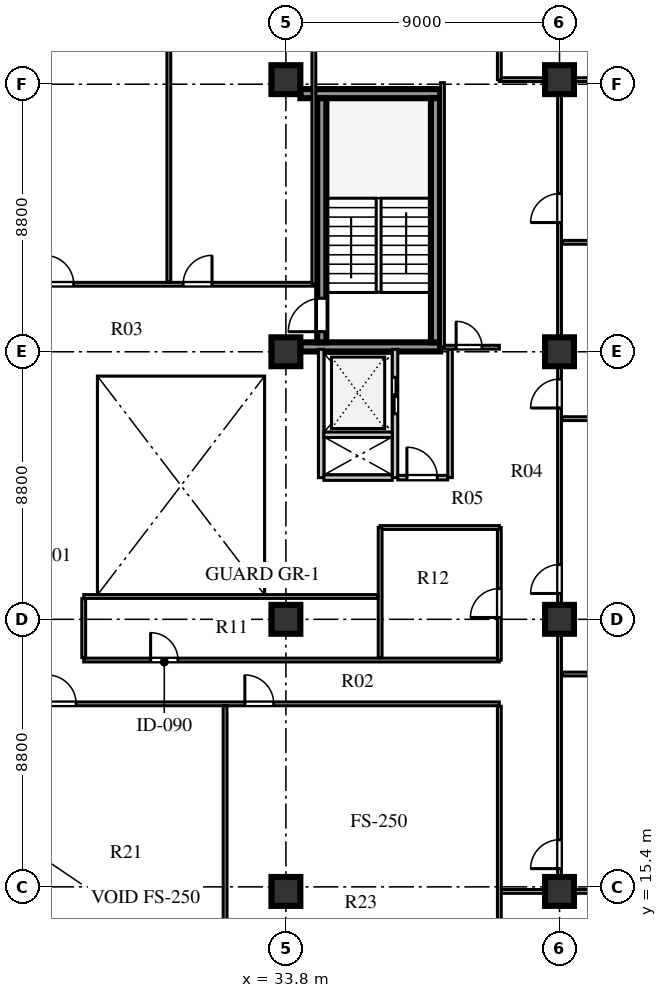
"""IFC4 building model, lengths in metres.
Left out: names, types, materials, properties, quantities, classifications, styles, units other than length and angle.
Written with IfcOpenShell. Run it as: python <this file> out.ifc"""

import sys

from ifc_helpers import new_model, si_unit, direction, frame, frame_2d, origin, origin_2d, place, context, subcontext, project, spatial, rectangle, extrude, element, fill, save


model = new_model("IFC4")
c1 = context("Model", 3, precision=1e-05, world=origin(), true_north=direction((0.0, 1.0)))
c2 = subcontext(c1, "Body", "Model", "MODEL_VIEW")
j1 = project(units=[si_unit("LENGTHUNIT", "METRE"), si_unit("PLANEANGLEUNIT", "RADIAN")], contexts=[c1])
p1 = place(None, origin())
s1 = spatial("IfcSite", under=j1, at=p1, CompositionType="ELEMENT")
p2 = place(p1, origin())
s2 = spatial("IfcBuilding", under=s1, at=p2, CompositionType="ELEMENT")
p3 = place(p2, frame((0.0, 0.0, 165.6)))
s3 = spatial("IfcBuildingStorey", under=s2, at=p3, CompositionType="ELEMENT", Elevation=165.6)
for number, where, z_axis, x_axis in (
    (1, (34.275, 33.16, 0.0), (0.0, 0.0, 1.0), (1.0, 0.0, 0.0)),
    (2, (34.275, 41.49, 0.0), (0.0, 0.0, 1.0), (1.0, 0.0, 0.0)),
):
    element("IfcWall", number, at=place(p3, frame(where, z_axis=z_axis, x_axis=x_axis)), inside=s3, PredefinedType="SHEAR", context=c2, shape_type="SweptSolid", body=[
        extrude(rectangle(XDim=4.595, YDim=0.3, at=frame_2d((2.298, 0.0))), origin(), (0.0, 0.0, 1.0), 3.6),
    ])
p4 = place(p3, frame((34.98, 33.31, 0.0), z_axis=(0.0, 0.0, 1.0), x_axis=(0.0, 1.0, 0.0)))
e3 = element("IfcWall", 3, at=p4, inside=s3, PredefinedType="SHEAR", context=c2, shape_type="SweptSolid", body=[
    extrude(rectangle(XDim=8.03, YDim=0.3, at=frame_2d((4.015, 0.0))), origin(), (0.0, 0.0, 1.0), 3.6),
])
p5 = place(p4, frame((0.35, 0.0, 0.0)))
e4 = element("IfcOpeningElement", 4, at=p5, cuts=e3, PredefinedType="OPENING", context=c2, shape_type="SweptSolid", body=[
    extrude(rectangle(XDim=1.1, YDim=2.1, at=frame_2d((0.55, 1.05))), frame((0.0, 0.16, 0.0), z_axis=(0.0, -1.0, 0.0), x_axis=(1.0, 0.0, 0.0)), (0.0, 0.0, 1.0), 0.32),
])
p6 = place(p3, frame((38.72, 33.31, 0.0), z_axis=(0.0, 0.0, 1.0), x_axis=(0.0, 1.0, 0.0)))
e5 = element("IfcWall", 5, at=p6, inside=s3, PredefinedType="SHEAR", context=c2, shape_type="SweptSolid", body=[
    extrude(rectangle(XDim=8.03, YDim=0.3, at=frame_2d((4.015, 0.0))), origin(), (0.0, 0.0, 1.0), 3.6),
])
for number, where, z_axis, x_axis in (
    (6, (33.8, 15.25, 0.0), (0.0, 0.0, 1.0), (1.0, 0.0, 0.0)),
    (7, (33.8, 24.2, 0.0), (0.0, 0.0, 1.0), (1.0, 0.0, 0.0)),
    (8, (33.8, 33.0, 0.0), (0.0, 0.0, 1.0), (1.0, 0.0, 0.0)),
    (9, (33.8, 41.95, 0.0), (0.0, 0.0, 1.0), (1.0, 0.0, 0.0)),
    (10, (42.8, 15.25, 0.0), (0.0, 0.0, 1.0), (1.0, 0.0, 0.0)),
    (11, (42.8, 24.2, 0.0), (0.0, 0.0, 1.0), (1.0, 0.0, 0.0)),
    (12, (42.8, 33.0, 0.0), (0.0, 0.0, 1.0), (1.0, 0.0, 0.0)),
    (13, (42.8, 41.95, 0.0), (0.0, 0.0, 1.0), (1.0, 0.0, 0.0)),
):
    element("IfcColumn", number, at=place(p3, frame(where, z_axis=z_axis, x_axis=x_axis)), inside=s3, PredefinedType="COLUMN", context=c2, shape_type="SweptSolid", body=[
        extrude(rectangle(XDim=0.95, YDim=0.95, at=origin_2d()), origin(), (0.0, 0.0, 1.0), 3.6),
    ])
p7 = place(p3, frame((34.96, 28.86, 0.0), z_axis=(0.0, 0.0, 1.0), x_axis=(0.0, 1.0, 0.0)))
e14 = element("IfcWall", 14, at=p7, inside=s3, PredefinedType="SOLIDWALL", context=c2, shape_type="SweptSolid", body=[
    extrude(rectangle(XDim=4.22, YDim=0.18, at=frame_2d((2.11, 0.0))), origin(), (0.0, 0.0, 1.0), 3.6),
])
p8 = place(p3, frame((37.39, 28.86, 0.0), z_axis=(0.0, 0.0, 1.0), x_axis=(0.0, 1.0, 0.0)))
e15 = element("IfcWall", 15, at=p8, inside=s3, PredefinedType="SOLIDWALL", context=c2, shape_type="SweptSolid", body=[
    extrude(rectangle(XDim=4.22, YDim=0.18, at=frame_2d((2.11, 0.0))), origin(), (0.0, 0.0, 1.0), 3.6),
])
p9 = place(p8, frame((2.1, 0.0, 0.0)))
e16 = element("IfcOpeningElement", 16, at=p9, cuts=e15, PredefinedType="OPENING", context=c2, shape_type="SweptSolid", body=[
    extrude(rectangle(XDim=1.2, YDim=2.12, at=frame_2d((0.6, 1.06))), frame((0.0, 0.1, 0.0), z_axis=(0.0, -1.0, 0.0), x_axis=(1.0, 0.0, 0.0)), (0.0, 0.0, 1.0), 0.2),
])
for number, where, z_axis, x_axis in (
    (17, (35.05, 28.86, 0.0), (0.0, 0.0, 1.0), (1.0, 0.0, 0.0)),
    (18, (35.05, 30.27, 0.0), (0.0, 0.0, 1.0), (1.0, 0.0, 0.0)),
):
    element("IfcWall", number, at=place(p3, frame(where, z_axis=z_axis, x_axis=x_axis)), inside=s3, PredefinedType="SOLIDWALL", context=c2, shape_type="SweptSolid", body=[
        extrude(rectangle(XDim=2.25, YDim=0.18, at=frame_2d((1.125, 0.0))), origin(), (0.0, 0.0, 1.0), 3.6),
    ])
p10 = place(p3, frame((39.2, 28.86, 0.0), z_axis=(0.0, 0.0, 1.0), x_axis=(0.0, 1.0, 0.0)))
e19 = element("IfcWall", 19, at=p10, inside=s3, PredefinedType="PARTITIONING", context=c2, shape_type="SweptSolid", body=[
    extrude(rectangle(XDim=4.22, YDim=0.15, at=frame_2d((2.11, 0.0))), origin(), (0.0, 0.0, 1.0), 3.6),
])
p11 = place(p3, frame((37.48, 28.86, 0.0), z_axis=(0.0, 0.0, 1.0), x_axis=(1.0, 0.0, 0.0)))
e20 = element("IfcWall", 20, at=p11, inside=s3, PredefinedType="PARTITIONING", context=c2, shape_type="SweptSolid", body=[
    extrude(rectangle(XDim=1.64, YDim=0.15, at=frame_2d((0.82, 0.0))), origin(), (0.0, 0.0, 1.0), 3.6),
])
p12 = place(p11, frame((0.3, 0.0, 0.0)))
e21 = element("IfcOpeningElement", 21, at=p12, cuts=e20, PredefinedType="OPENING", context=c2, shape_type="SweptSolid", body=[
    extrude(rectangle(XDim=1.0, YDim=2.1, at=frame_2d((0.5, 1.05))), frame((0.0, 0.085, 0.0), z_axis=(0.0, -1.0, 0.0), x_axis=(1.0, 0.0, 0.0)), (0.0, 0.0, 1.0), 0.17),
])
p13 = place(p3, frame((25.22, 21.42, 0.0), z_axis=(0.0, 0.0, 1.0), x_axis=(1.0, 0.0, 0.0)))
e22 = element("IfcWall", 22, at=p13, inside=s3, PredefinedType="PLUMBINGWALL", context=c2, shape_type="SweptSolid", body=[
    extrude(rectangle(XDim=15.6, YDim=0.125, at=frame_2d((7.8, 0.0))), origin(), (0.0, 0.0, 1.0), 3.25),
])
p14 = place(p13, frame((0.73, 0.0, 0.0)))
e23 = element("IfcOpeningElement", 23, at=p14, cuts=e22, PredefinedType="OPENING", context=c2, shape_type="SweptSolid", body=[
    extrude(rectangle(XDim=0.95, YDim=2.1, at=frame_2d((0.475, 1.05))), frame((0.0, 0.073, 0.0), z_axis=(0.0, -1.0, 0.0), x_axis=(1.0, 0.0, 0.0)), (0.0, 0.0, 1.0), 0.145),
])
p15 = place(p13, frame((7.23, 0.0, 0.0)))
e24 = element("IfcOpeningElement", 24, at=p15, cuts=e22, PredefinedType="OPENING", context=c2, shape_type="SweptSolid", body=[
    extrude(rectangle(XDim=0.95, YDim=2.1, at=frame_2d((0.475, 1.05))), frame((0.0, 0.073, 0.0), z_axis=(0.0, -1.0, 0.0), x_axis=(1.0, 0.0, 0.0)), (0.0, 0.0, 1.0), 0.145),
])
p16 = place(p3, frame((27.15, 22.86, 0.0), z_axis=(0.0, 0.0, 1.0), x_axis=(1.0, 0.0, 0.0)))
e25 = element("IfcWall", 25, at=p16, inside=s3, PredefinedType="PLUMBINGWALL", context=c2, shape_type="SweptSolid", body=[
    extrude(rectangle(XDim=13.67, YDim=0.125, at=frame_2d((6.835, 0.0))), origin(), (0.0, 0.0, 1.0), 3.6),
])
p17 = place(p16, frame((2.2, 0.0, 0.0)))
e26 = element("IfcOpeningElement", 26, at=p17, cuts=e25, PredefinedType="OPENING", context=c2, shape_type="SweptSolid", body=[
    extrude(rectangle(XDim=0.9, YDim=2.08, at=frame_2d((0.45, 1.04))), frame((0.0, 0.073, 0.0), z_axis=(0.0, -1.0, 0.0), x_axis=(1.0, 0.0, 0.0)), (0.0, 0.0, 1.0), 0.145),
])
p18 = place(p3, frame((25.22, 35.22, 0.0), z_axis=(0.0, 0.0, 1.0), x_axis=(1.0, 0.0, 0.0)))
e27 = element("IfcWall", 27, at=p18, inside=s3, PredefinedType="PLUMBINGWALL", context=c2, shape_type="SweptSolid", body=[
    extrude(rectangle(XDim=9.5, YDim=0.125, at=frame_2d((4.75, 0.0))), origin(), (0.0, 0.0, 1.0), 3.6),
])
p19 = place(p18, frame((0.65, 0.0, 0.0)))
e28 = element("IfcOpeningElement", 28, at=p19, cuts=e27, PredefinedType="OPENING", context=c2, shape_type="SweptSolid", body=[
    extrude(rectangle(XDim=0.95, YDim=2.1, at=frame_2d((0.475, 1.05))), frame((0.0, 0.073, 0.0), z_axis=(0.0, -1.0, 0.0), x_axis=(1.0, 0.0, 0.0)), (0.0, 0.0, 1.0), 0.145),
])
p20 = place(p18, frame((5.2, 0.0, 0.0)))
e29 = element("IfcOpeningElement", 29, at=p20, cuts=e27, PredefinedType="OPENING", context=c2, shape_type="SweptSolid", body=[
    extrude(rectangle(XDim=0.95, YDim=2.1, at=frame_2d((0.475, 1.05))), frame((0.0, 0.073, 0.0), z_axis=(0.0, -1.0, 0.0), x_axis=(1.0, 0.0, 0.0)), (0.0, 0.0, 1.0), 0.145),
])
p21 = place(p3, frame((42.8, 15.25, 0.0), z_axis=(0.0, 0.0, 1.0), x_axis=(0.0, 1.0, 0.0)))
e30 = element("IfcWall", 30, at=p21, inside=s3, PredefinedType="PLUMBINGWALL", context=c2, shape_type="SweptSolid", body=[
    extrude(rectangle(XDim=26.7, YDim=0.125, at=frame_2d((13.35, 0.0))), origin(), (0.0, 0.0, 1.0), 2.95),
])
p22 = place(p21, frame((0.75, 0.0, 0.0)))
e31 = element("IfcOpeningElement", 31, at=p22, cuts=e30, PredefinedType="OPENING", context=c2, shape_type="SweptSolid", body=[
    extrude(rectangle(XDim=0.95, YDim=2.1, at=frame_2d((0.475, 1.05))), frame((0.0, 0.073, 0.0), z_axis=(0.0, -1.0, 0.0), x_axis=(1.0, 0.0, 0.0)), (0.0, 0.0, 1.0), 0.145),
])
p23 = place(p21, frame((9.8, 0.0, 0.0)))
e32 = element("IfcOpeningElement", 32, at=p23, cuts=e30, PredefinedType="OPENING", context=c2, shape_type="SweptSolid", body=[
    extrude(rectangle(XDim=0.95, YDim=2.1, at=frame_2d((0.475, 1.05))), frame((0.0, 0.073, 0.0), z_axis=(0.0, -1.0, 0.0), x_axis=(1.0, 0.0, 0.0)), (0.0, 0.0, 1.0), 0.145),
])
p24 = place(p21, frame((15.9, 0.0, 0.0)))
e33 = element("IfcOpeningElement", 33, at=p24, cuts=e30, PredefinedType="OPENING", context=c2, shape_type="SweptSolid", body=[
    extrude(rectangle(XDim=0.95, YDim=2.1, at=frame_2d((0.475, 1.05))), frame((0.0, 0.073, 0.0), z_axis=(0.0, -1.0, 0.0), x_axis=(1.0, 0.0, 0.0)), (0.0, 0.0, 1.0), 0.145),
])
p25 = place(p21, frame((22.0, 0.0, 0.0)))
e34 = element("IfcOpeningElement", 34, at=p25, cuts=e30, PredefinedType="OPENING", context=c2, shape_type="SweptSolid", body=[
    extrude(rectangle(XDim=0.95, YDim=2.1, at=frame_2d((0.475, 1.05))), frame((0.0, 0.073, 0.0), z_axis=(0.0, -1.0, 0.0), x_axis=(1.0, 0.0, 0.0)), (0.0, 0.0, 1.0), 0.145),
])
for number, where, z_axis, x_axis in (
    (35, (40.82, 15.25, 0.0), (0.0, 0.0, 1.0), (1.0, 0.0, 0.0)),
    (36, (40.82, 41.95, 0.0), (0.0, 0.0, 1.0), (1.0, 0.0, 0.0)),
):
    element("IfcWall", number, at=place(p3, frame(where, z_axis=z_axis, x_axis=x_axis)), inside=s3, PredefinedType="PLUMBINGWALL", context=c2, shape_type="SweptSolid", body=[
        extrude(rectangle(XDim=9.7, YDim=0.125, at=frame_2d((4.85, 0.0))), origin(), (0.0, 0.0, 1.0), 2.95),
    ])
p26 = place(p3, frame((40.82, 22.86, 0.0), z_axis=(0.0, 0.0, 1.0), x_axis=(0.0, 1.0, 0.0)))
e37 = element("IfcWall", 37, at=p26, inside=s3, PredefinedType="PLUMBINGWALL", context=c2, shape_type="SweptSolid", body=[
    extrude(rectangle(XDim=4.36, YDim=0.125, at=frame_2d((2.18, 0.0))), origin(), (0.0, 0.0, 1.0), 3.6),
])
p27 = place(p26, frame((1.4, 0.0, 0.0)))
e38 = element("IfcOpeningElement", 38, at=p27, cuts=e37, PredefinedType="OPENING", context=c2, shape_type="SweptSolid", body=[
    extrude(rectangle(XDim=0.95, YDim=2.1, at=frame_2d((0.475, 1.05))), frame((0.0, 0.073, 0.0), z_axis=(0.0, -1.0, 0.0), x_axis=(1.0, 0.0, 0.0)), (0.0, 0.0, 1.0), 0.145),
])
p28 = place(p3, frame((36.9, 27.22, 0.0), z_axis=(0.0, 0.0, 1.0), x_axis=(1.0, 0.0, 0.0)))
e39 = element("IfcWall", 39, at=p28, inside=s3, PredefinedType="PLUMBINGWALL", context=c2, shape_type="SweptSolid", body=[
    extrude(rectangle(XDim=3.92, YDim=0.125, at=frame_2d((1.96, 0.0))), origin(), (0.0, 0.0, 1.0), 3.25),
])
p29 = place(p3, frame((36.9, 22.94, 0.0), z_axis=(0.0, 0.0, 1.0), x_axis=(0.0, 1.0, 0.0)))
e40 = element("IfcWall", 40, at=p29, inside=s3, PredefinedType="PLUMBINGWALL", context=c2, shape_type="SweptSolid", body=[
    extrude(rectangle(XDim=4.28, YDim=0.125, at=frame_2d((2.14, 0.0))), origin(), (0.0, 0.0, 1.0), 3.6),
])
p30 = place(p3, frame((27.15, 24.95, 0.0), z_axis=(0.0, 0.0, 1.0), x_axis=(1.0, 0.0, 0.0)))
e41 = element("IfcWall", 41, at=p30, inside=s3, PredefinedType="PLUMBINGWALL", context=c2, shape_type="SweptSolid", body=[
    extrude(rectangle(XDim=9.67, YDim=0.125, at=frame_2d((4.835, 0.0))), origin(), (0.0, 0.0, 1.0), 3.05),
])
p31 = place(p3, frame((27.15, 22.94, 0.0), z_axis=(0.0, 0.0, 1.0), x_axis=(0.0, 1.0, 0.0)))
e42 = element("IfcWall", 42, at=p31, inside=s3, PredefinedType="PLUMBINGWALL", context=c2, shape_type="SweptSolid", body=[
    extrude(rectangle(XDim=1.94, YDim=0.125, at=frame_2d((0.97, 0.0))), origin(), (0.0, 0.0, 1.0), 3.6),
])
p32 = place(p3, frame((40.82, 7.88, 0.0), z_axis=(0.0, 0.0, 1.0), x_axis=(0.0, 1.0, 0.0)))
e43 = element("IfcWall", 43, at=p32, inside=s3, PredefinedType="PLUMBINGWALL", context=c2, shape_type="SweptSolid", body=[
    extrude(rectangle(XDim=13.46, YDim=0.125, at=frame_2d((6.73, 0.0))), origin(), (0.0, 0.0, 1.0), 3.6),
])
p33 = place(p3, frame((31.8, 7.88, 0.0), z_axis=(0.0, 0.0, 1.0), x_axis=(0.0, 1.0, 0.0)))
e44 = element("IfcWall", 44, at=p33, inside=s3, PredefinedType="PLUMBINGWALL", context=c2, shape_type="SweptSolid", body=[
    extrude(rectangle(XDim=13.48, YDim=0.125, at=frame_2d((6.74, 0.0))), origin(), (0.0, 0.0, 1.0), 3.6),
])
for number, where, z_axis, x_axis in (
    (45, (42.88, 22.4, 0.0), (0.0, 0.0, 1.0), (1.0, 0.0, 0.0)),
    (46, (42.88, 30.8, 0.0), (0.0, 0.0, 1.0), (1.0, 0.0, 0.0)),
    (47, (42.88, 36.6, 0.0), (0.0, 0.0, 1.0), (1.0, 0.0, 0.0)),
):
    element("IfcWall", number, at=place(p3, frame(where, z_axis=z_axis, x_axis=x_axis)), inside=s3, PredefinedType="PLUMBINGWALL", context=c2, shape_type="SweptSolid", body=[
        extrude(rectangle(XDim=7.64, YDim=0.125, at=frame_2d((3.82, 0.0))), origin(), (0.0, 0.0, 1.0), 3.6),
    ])
p34 = place(p3, frame((34.72, 35.22, 0.0), z_axis=(0.0, 0.0, 1.0), x_axis=(0.0, 1.0, 0.0)))
e48 = element("IfcWall", 48, at=p34, inside=s3, PredefinedType="PLUMBINGWALL", context=c2, shape_type="SweptSolid", body=[
    extrude(rectangle(XDim=14.1, YDim=0.125, at=frame_2d((7.05, 0.0))), origin(), (0.0, 0.0, 1.0), 3.6),
])
p35 = place(p3, frame((29.95, 35.3, 0.0), z_axis=(0.0, 0.0, 1.0), x_axis=(0.0, 1.0, 0.0)))
e49 = element("IfcWall", 49, at=p35, inside=s3, PredefinedType="PLUMBINGWALL", context=c2, shape_type="SweptSolid", body=[
    extrude(rectangle(XDim=14.02, YDim=0.125, at=frame_2d((7.01, 0.0))), origin(), (0.0, 0.0, 1.0), 3.6),
])
p36 = place(p3, frame((38.95, 33.15, 0.0), z_axis=(0.0, 0.0, 1.0), x_axis=(1.0, 0.0, 0.0)))
e50 = element("IfcWall", 50, at=p36, inside=s3, PredefinedType="PLUMBINGWALL", context=c2, shape_type="SweptSolid", body=[
    extrude(rectangle(XDim=1.87, YDim=0.125, at=frame_2d((0.935, 0.0))), origin(), (0.0, 0.0, 1.0), 3.6),
])
p37 = place(p36, frame((0.45, 0.0, 0.0)))
e51 = element("IfcOpeningElement", 51, at=p37, cuts=e50, PredefinedType="OPENING", context=c2, shape_type="SweptSolid", body=[
    extrude(rectangle(XDim=0.85, YDim=2.05, at=frame_2d((0.425, 1.025))), frame((0.0, 0.073, 0.0), z_axis=(0.0, -1.0, 0.0), x_axis=(1.0, 0.0, 0.0)), (0.0, 0.0, 1.0), 0.145),
])
p38 = place(p3, frame((38.95, 33.15, 0.0), z_axis=(0.0, 0.0, 1.0), x_axis=(0.0, 1.0, 0.0)))
e52 = element("IfcWall", 52, at=p38, inside=s3, PredefinedType="PLUMBINGWALL", context=c2, shape_type="SweptSolid", body=[
    extrude(rectangle(XDim=8.7, YDim=0.125, at=frame_2d((4.35, 0.0))), origin(), (0.0, 0.0, 1.0), 3.6),
])
p39 = place(p3, frame((40.82, 41.95, 0.0), z_axis=(0.0, 0.0, 1.0), x_axis=(0.0, 1.0, 0.0)))
e53 = element("IfcWall", 53, at=p39, inside=s3, PredefinedType="PLUMBINGWALL", context=c2, shape_type="SweptSolid", body=[
    extrude(rectangle(XDim=7.37, YDim=0.125, at=frame_2d((3.685, 0.0))), origin(), (0.0, 0.0, 1.0), 3.6),
])
p40 = place(p5, origin())
e54 = element("IfcDoor", 54, at=p40, inside=s3, OperationType="SINGLE_SWING_LEFT", PredefinedType="DOOR", context=c2, shape_type="SweptSolid", body=[
    extrude(rectangle(XDim=1.1, YDim=2.1, at=frame_2d((0.55, 1.05))), frame((0.0, 0.025, 0.0), z_axis=(0.0, -1.0, 0.0), x_axis=(1.0, 0.0, 0.0)), (0.0, 0.0, 1.0), 0.05),
])
fill(e4, e54)
p41 = place(p9, frame((1.2, 0.0, 0.0), z_axis=(0.0, 0.0, 1.0), x_axis=(-1.0, 0.0, 0.0)))
e55 = element("IfcDoor", 55, at=p41, inside=s3, OperationType="DOUBLE_DOOR_SLIDING", PredefinedType="DOOR", context=c2, shape_type="SweptSolid", body=[
    extrude(rectangle(XDim=1.2, YDim=2.12, at=frame_2d((0.6, 1.06))), frame((0.0, 0.025, 0.0), z_axis=(0.0, -1.0, 0.0), x_axis=(1.0, 0.0, 0.0)), (0.0, 0.0, 1.0), 0.05),
])
fill(e16, e55)
p42 = place(p12, origin())
e56 = element("IfcDoor", 56, at=p42, inside=s3, OperationType="SINGLE_SWING_LEFT", PredefinedType="DOOR", context=c2, shape_type="SweptSolid", body=[
    extrude(rectangle(XDim=1.0, YDim=2.1, at=frame_2d((0.5, 1.05))), frame((0.0, 0.025, 0.0), z_axis=(0.0, -1.0, 0.0), x_axis=(1.0, 0.0, 0.0)), (0.0, 0.0, 1.0), 0.05),
])
fill(e21, e56)
p43 = place(p17, origin())
e57 = element("IfcDoor", 57, at=p43, inside=s3, OperationType="SINGLE_SWING_LEFT", PredefinedType="DOOR", context=c2, shape_type="SweptSolid", body=[
    extrude(rectangle(XDim=0.9, YDim=2.08, at=frame_2d((0.45, 1.04))), frame((0.0, 0.025, 0.0), z_axis=(0.0, -1.0, 0.0), x_axis=(1.0, 0.0, 0.0)), (0.0, 0.0, 1.0), 0.05),
])
fill(e26, e57)
p44 = place(p27, frame((0.95, 0.0, 0.0), z_axis=(0.0, 0.0, 1.0), x_axis=(-1.0, 0.0, 0.0)))
e58 = element("IfcDoor", 58, at=p44, inside=s3, OperationType="SINGLE_SWING_RIGHT", PredefinedType="DOOR", context=c2, shape_type="SweptSolid", body=[
    extrude(rectangle(XDim=0.95, YDim=2.1, at=frame_2d((0.475, 1.05))), frame((0.0, 0.025, 0.0), z_axis=(0.0, -1.0, 0.0), x_axis=(1.0, 0.0, 0.0)), (0.0, 0.0, 1.0), 0.05),
])
fill(e38, e58)
p45 = place(p14, frame((0.95, 0.0, 0.0), z_axis=(0.0, 0.0, 1.0), x_axis=(-1.0, 0.0, 0.0)))
e59 = element("IfcDoor", 59, at=p45, inside=s3, OperationType="SINGLE_SWING_RIGHT", PredefinedType="DOOR", context=c2, shape_type="SweptSolid", body=[
    extrude(rectangle(XDim=0.95, YDim=2.1, at=frame_2d((0.475, 1.05))), frame((0.0, 0.025, 0.0), z_axis=(0.0, -1.0, 0.0), x_axis=(1.0, 0.0, 0.0)), (0.0, 0.0, 1.0), 0.05),
])
fill(e23, e59)
p46 = place(p15, frame((0.95, 0.0, 0.0), z_axis=(0.0, 0.0, 1.0), x_axis=(-1.0, 0.0, 0.0)))
e60 = element("IfcDoor", 60, at=p46, inside=s3, OperationType="SINGLE_SWING_RIGHT", PredefinedType="DOOR", context=c2, shape_type="SweptSolid", body=[
    extrude(rectangle(XDim=0.95, YDim=2.1, at=frame_2d((0.475, 1.05))), frame((0.0, 0.025, 0.0), z_axis=(0.0, -1.0, 0.0), x_axis=(1.0, 0.0, 0.0)), (0.0, 0.0, 1.0), 0.05),
])
fill(e24, e60)
p47 = place(p22, origin())
e61 = element("IfcDoor", 61, at=p47, inside=s3, OperationType="SINGLE_SWING_LEFT", PredefinedType="DOOR", context=c2, shape_type="SweptSolid", body=[
    extrude(rectangle(XDim=0.95, YDim=2.1, at=frame_2d((0.475, 1.05))), frame((0.0, 0.025, 0.0), z_axis=(0.0, -1.0, 0.0), x_axis=(1.0, 0.0, 0.0)), (0.0, 0.0, 1.0), 0.05),
])
fill(e31, e61)
p48 = place(p23, origin())
e62 = element("IfcDoor", 62, at=p48, inside=s3, OperationType="SINGLE_SWING_LEFT", PredefinedType="DOOR", context=c2, shape_type="SweptSolid", body=[
    extrude(rectangle(XDim=0.95, YDim=2.1, at=frame_2d((0.475, 1.05))), frame((0.0, 0.025, 0.0), z_axis=(0.0, -1.0, 0.0), x_axis=(1.0, 0.0, 0.0)), (0.0, 0.0, 1.0), 0.05),
])
fill(e32, e62)
p49 = place(p24, origin())
e63 = element("IfcDoor", 63, at=p49, inside=s3, OperationType="SINGLE_SWING_LEFT", PredefinedType="DOOR", context=c2, shape_type="SweptSolid", body=[
    extrude(rectangle(XDim=0.95, YDim=2.1, at=frame_2d((0.475, 1.05))), frame((0.0, 0.025, 0.0), z_axis=(0.0, -1.0, 0.0), x_axis=(1.0, 0.0, 0.0)), (0.0, 0.0, 1.0), 0.05),
])
fill(e33, e63)
p50 = place(p25, origin())
e64 = element("IfcDoor", 64, at=p50, inside=s3, OperationType="SINGLE_SWING_LEFT", PredefinedType="DOOR", context=c2, shape_type="SweptSolid", body=[
    extrude(rectangle(XDim=0.95, YDim=2.1, at=frame_2d((0.475, 1.05))), frame((0.0, 0.025, 0.0), z_axis=(0.0, -1.0, 0.0), x_axis=(1.0, 0.0, 0.0)), (0.0, 0.0, 1.0), 0.05),
])
fill(e34, e64)
p51 = place(p19, origin())
e65 = element("IfcDoor", 65, at=p51, inside=s3, OperationType="SINGLE_SWING_LEFT", PredefinedType="DOOR", context=c2, shape_type="SweptSolid", body=[
    extrude(rectangle(XDim=0.95, YDim=2.1, at=frame_2d((0.475, 1.05))), frame((0.0, 0.025, 0.0), z_axis=(0.0, -1.0, 0.0), x_axis=(1.0, 0.0, 0.0)), (0.0, 0.0, 1.0), 0.05),
])
fill(e28, e65)
p52 = place(p20, origin())
e66 = element("IfcDoor", 66, at=p52, inside=s3, OperationType="SINGLE_SWING_RIGHT", PredefinedType="DOOR", context=c2, shape_type="SweptSolid", body=[
    extrude(rectangle(XDim=0.95, YDim=2.1, at=frame_2d((0.475, 1.05))), frame((0.0, 0.025, 0.0), z_axis=(0.0, -1.0, 0.0), x_axis=(1.0, 0.0, 0.0)), (0.0, 0.0, 1.0), 0.05),
])
fill(e29, e66)
p53 = place(p37, origin())
e67 = element("IfcDoor", 67, at=p53, inside=s3, OperationType="SINGLE_SWING_LEFT", PredefinedType="DOOR", context=c2, shape_type="SweptSolid", body=[
    extrude(rectangle(XDim=0.85, YDim=2.05, at=frame_2d((0.425, 1.025))), frame((0.0, 0.025, 0.0), z_axis=(0.0, -1.0, 0.0), x_axis=(1.0, 0.0, 0.0)), (0.0, 0.0, 1.0), 0.05),
])
fill(e51, e67)
save(model, sys.argv[1])
